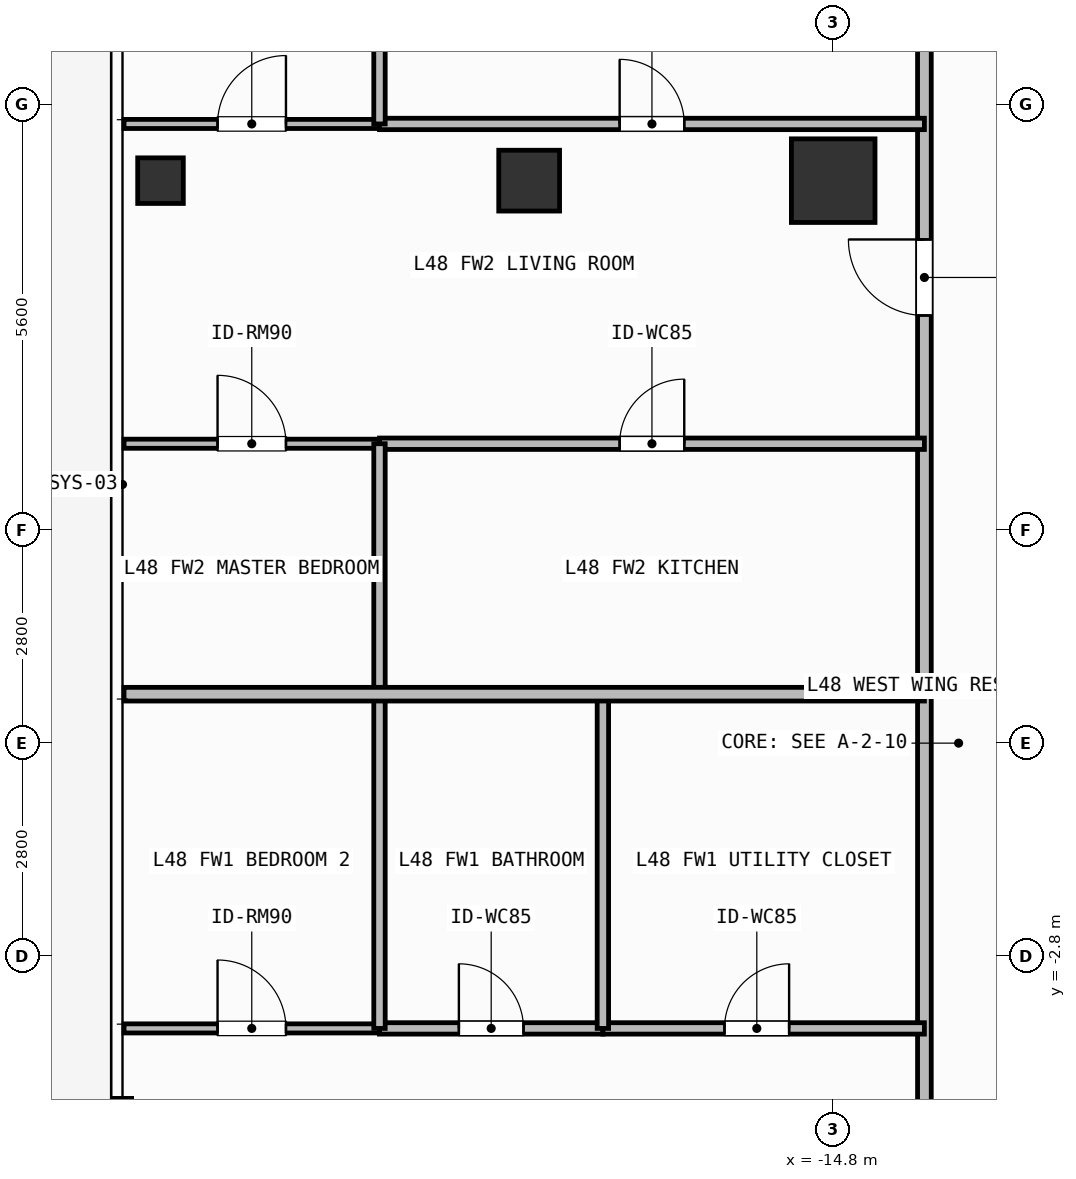
"""IFC4 building model, lengths in metres.
Left out: names, types, materials, properties, quantities, classifications, styles, units other than length and angle.
Written with IfcOpenShell. Run it as: python <this file> out.ifc"""

import sys

from ifc_helpers import new_model, si_unit, direction, frame, frame_2d, origin, origin_2d, place, context, subcontext, project, spatial, rectangle, hollow_rectangle, extrude, element, fill, save


model = new_model("IFC4")
c1 = context("Model", 3, precision=1e-05, world=origin(), true_north=direction((0.0, 1.0)))
c2 = subcontext(c1, "Body", "Model", "MODEL_VIEW")
j1 = project(units=[si_unit("LENGTHUNIT", "METRE"), si_unit("PLANEANGLEUNIT", "RADIAN")], contexts=[c1])
p1 = place(None, origin())
s1 = spatial("IfcSite", under=j1, at=p1, CompositionType="ELEMENT")
p2 = place(p1, origin())
s2 = spatial("IfcBuilding", under=s1, at=p2, CompositionType="ELEMENT")
p3 = place(p2, frame((0.0, 0.0, 195.3)))
s3 = spatial("IfcBuildingStorey", under=s2, at=p3, CompositionType="ELEMENT", Elevation=195.3)
p4 = place(p3, frame((-14.8, 7.4, 0.0), z_axis=(0.0, 0.0, 1.0), x_axis=(1.0, 0.0, 0.0)))
e1 = element("IfcColumn", 1, at=p4, inside=s3, PredefinedType="COLUMN", context=c2, shape_type="SweptSolid", body=[
    extrude(rectangle(XDim=1.1, YDim=1.1, at=origin_2d()), origin(), (0.0, 0.0, 1.0), 3.9),
])
p5 = place(p3, frame((-18.8, 7.4, 0.0), z_axis=(0.0, 0.0, 1.0), x_axis=(1.0, 0.0, 0.0)))
e2 = element("IfcColumn", 2, at=p5, inside=s3, PredefinedType="COLUMN", context=c2, shape_type="SweptSolid", body=[
    extrude(hollow_rectangle(XDim=0.8, YDim=0.8, WallThickness=0.036, at=origin_2d()), origin(), (0.0, 0.0, 1.0), 3.9),
])
p6 = place(p3, frame((-23.65, 7.4, 0.0), z_axis=(0.0, 0.0, 1.0), x_axis=(1.0, 0.0, 0.0)))
e3 = element("IfcColumn", 3, at=p6, inside=s3, PredefinedType="COLUMN", context=c2, shape_type="SweptSolid", body=[
    extrude(hollow_rectangle(XDim=0.6, YDim=0.6, WallThickness=0.028, at=origin_2d()), origin(), (0.0, 0.0, 1.0), 3.9),
])
p7 = place(p3, frame((-24.15, -6.254, 0.0), z_axis=(0.0, 0.0, 1.0), x_axis=(0.0, 1.0, 0.0)))
e4 = element("IfcWall", 4, at=p7, inside=s3, PredefinedType="SOLIDWALL", context=c2, shape_type="SweptSolid", body=[
    extrude(rectangle(XDim=1.58, YDim=0.24, at=frame_2d((0.79, 0.0))), origin(), (0.0, 0.0, 1.0), 3.68),
])
p8 = place(p7, frame((0.24, 0.0, 0.0)))
e5 = element("IfcOpeningElement", 5, at=p8, cuts=e4, PredefinedType="OPENING", context=c2, shape_type="SweptSolid", body=[
    extrude(rectangle(XDim=1.1, YDim=2.2, at=frame_2d((0.55, 1.1))), frame((0.0, 0.13, 0.0), z_axis=(0.0, -1.0, 0.0), x_axis=(1.0, 0.0, 0.0)), (0.0, 0.0, 1.0), 0.26),
])
p9 = place(p3, frame((-13.6, -12.12, 0.0), z_axis=(0.0, 0.0, 1.0), x_axis=(0.0, 1.0, 0.0)))
e6 = element("IfcWall", 6, at=p9, inside=s3, PredefinedType="PARTITIONING", context=c2, shape_type="SweptSolid", body=[
    extrude(rectangle(XDim=12.764, YDim=0.18, at=frame_2d((6.382, 0.0))), origin(), (0.0, 0.0, 1.0), 3.68),
])
p10 = place(p9, frame((5.346, 0.0, 0.0)))
e7 = element("IfcOpeningElement", 7, at=p10, cuts=e6, PredefinedType="OPENING", context=c2, shape_type="SweptSolid", body=[
    extrude(rectangle(XDim=1.0, YDim=2.2, at=frame_2d((0.5, 1.1))), frame((0.0, 0.1, 0.0), z_axis=(0.0, -1.0, 0.0), x_axis=(1.0, 0.0, 0.0)), (0.0, 0.0, 1.0), 0.2),
])
p11 = place(p3, frame((-20.769, -3.753, 0.0), z_axis=(0.0, 0.0, 1.0), x_axis=(1.0, 0.0, 0.0)))
e8 = element("IfcWall", 8, at=p11, inside=s3, PredefinedType="PARTITIONING", context=c2, shape_type="SweptSolid", body=[
    extrude(rectangle(XDim=2.939, YDim=0.15, at=frame_2d((1.469, 0.0))), origin(), (0.0, 0.0, 1.0), 3.68),
])
p12 = place(p11, frame((1.044, 0.0, 0.0)))
e9 = element("IfcOpeningElement", 9, at=p12, cuts=e8, PredefinedType="OPENING", context=c2, shape_type="SweptSolid", body=[
    extrude(rectangle(XDim=0.85, YDim=2.1, at=frame_2d((0.425, 1.05))), frame((0.0, 0.085, 0.0), z_axis=(0.0, -1.0, 0.0), x_axis=(1.0, 0.0, 0.0)), (0.0, 0.0, 1.0), 0.17),
])
p13 = place(p3, frame((-17.83, -3.753, 0.0), z_axis=(0.0, 0.0, 1.0), x_axis=(1.0, 0.0, 0.0)))
e10 = element("IfcWall", 10, at=p13, inside=s3, PredefinedType="PARTITIONING", context=c2, shape_type="SweptSolid", body=[
    extrude(rectangle(XDim=4.23, YDim=0.15, at=frame_2d((2.115, 0.0))), origin(), (0.0, 0.0, 1.0), 3.68),
])
p14 = place(p13, frame((1.6, 0.0, 0.0)))
e11 = element("IfcOpeningElement", 11, at=p14, cuts=e10, PredefinedType="OPENING", context=c2, shape_type="SweptSolid", body=[
    extrude(rectangle(XDim=0.85, YDim=2.1, at=frame_2d((0.425, 1.05))), frame((0.0, 0.085, 0.0), z_axis=(0.0, -1.0, 0.0), x_axis=(1.0, 0.0, 0.0)), (0.0, 0.0, 1.0), 0.17),
])
p15 = place(p3, frame((-24.13, -3.753, 0.0), z_axis=(0.0, 0.0, 1.0), x_axis=(1.0, 0.0, 0.0)))
e12 = element("IfcWall", 12, at=p15, inside=s3, PredefinedType="PARTITIONING", context=c2, shape_type="SweptSolid", body=[
    extrude(rectangle(XDim=3.361, YDim=0.12, at=frame_2d((1.68, 0.0))), origin(), (0.0, 0.0, 1.0), 3.68),
])
p16 = place(p15, frame((1.23, 0.0, 0.0)))
e13 = element("IfcOpeningElement", 13, at=p16, cuts=e12, PredefinedType="OPENING", context=c2, shape_type="SweptSolid", body=[
    extrude(rectangle(XDim=0.9, YDim=2.1, at=frame_2d((0.45, 1.05))), frame((0.0, 0.07, 0.0), z_axis=(0.0, -1.0, 0.0), x_axis=(1.0, 0.0, 0.0)), (0.0, 0.0, 1.0), 0.14),
])
p17 = place(p3, frame((-13.6, 0.644, 0.0), z_axis=(0.0, 0.0, 1.0), x_axis=(0.0, 1.0, 0.0)))
e14 = element("IfcWall", 14, at=p17, inside=s3, PredefinedType="PARTITIONING", context=c2, shape_type="SweptSolid", body=[
    extrude(rectangle(XDim=10.786, YDim=0.18, at=frame_2d((5.393, 0.0))), origin(), (0.0, 0.0, 1.0), 3.68),
])
p18 = place(p17, frame((4.982, 0.0, 0.0)))
e15 = element("IfcOpeningElement", 15, at=p18, cuts=e14, PredefinedType="OPENING", context=c2, shape_type="SweptSolid", body=[
    extrude(rectangle(XDim=1.0, YDim=2.2, at=frame_2d((0.5, 1.1))), frame((0.0, 0.1, 0.0), z_axis=(0.0, -1.0, 0.0), x_axis=(1.0, 0.0, 0.0)), (0.0, 0.0, 1.0), 0.2),
])
p19 = place(p3, frame((-20.769, 8.146, 0.0), z_axis=(0.0, 0.0, 1.0), x_axis=(1.0, 0.0, 0.0)))
e16 = element("IfcWall", 16, at=p19, inside=s3, PredefinedType="PARTITIONING", context=c2, shape_type="SweptSolid", body=[
    extrude(rectangle(XDim=7.169, YDim=0.15, at=frame_2d((3.584, 0.0))), origin(), (0.0, 0.0, 1.0), 3.68),
])
p20 = place(p19, frame((3.159, 0.0, 0.0)))
e17 = element("IfcOpeningElement", 17, at=p20, cuts=e16, PredefinedType="OPENING", context=c2, shape_type="SweptSolid", body=[
    extrude(rectangle(XDim=0.85, YDim=2.1, at=frame_2d((0.425, 1.05))), frame((0.0, 0.085, 0.0), z_axis=(0.0, -1.0, 0.0), x_axis=(1.0, 0.0, 0.0)), (0.0, 0.0, 1.0), 0.17),
])
p21 = place(p3, frame((-20.769, 3.939, 0.0), z_axis=(0.0, 0.0, 1.0), x_axis=(1.0, 0.0, 0.0)))
e18 = element("IfcWall", 18, at=p21, inside=s3, PredefinedType="PARTITIONING", context=c2, shape_type="SweptSolid", body=[
    extrude(rectangle(XDim=7.169, YDim=0.15, at=frame_2d((3.584, 0.0))), origin(), (0.0, 0.0, 1.0), 3.68),
])
p22 = place(p21, frame((3.159, 0.0, 0.0)))
e19 = element("IfcOpeningElement", 19, at=p22, cuts=e18, PredefinedType="OPENING", context=c2, shape_type="SweptSolid", body=[
    extrude(rectangle(XDim=0.85, YDim=2.1, at=frame_2d((0.425, 1.05))), frame((0.0, 0.085, 0.0), z_axis=(0.0, -1.0, 0.0), x_axis=(1.0, 0.0, 0.0)), (0.0, 0.0, 1.0), 0.17),
])
p23 = place(p3, frame((-24.13, 3.939, 0.0), z_axis=(0.0, 0.0, 1.0), x_axis=(1.0, 0.0, 0.0)))
e20 = element("IfcWall", 20, at=p23, inside=s3, PredefinedType="PARTITIONING", context=c2, shape_type="SweptSolid", body=[
    extrude(rectangle(XDim=3.361, YDim=0.12, at=frame_2d((1.68, 0.0))), origin(), (0.0, 0.0, 1.0), 3.68),
])
p24 = place(p23, frame((1.23, 0.0, 0.0)))
e21 = element("IfcOpeningElement", 21, at=p24, cuts=e20, PredefinedType="OPENING", context=c2, shape_type="SweptSolid", body=[
    extrude(rectangle(XDim=0.9, YDim=2.1, at=frame_2d((0.45, 1.05))), frame((0.0, 0.07, 0.0), z_axis=(0.0, -1.0, 0.0), x_axis=(1.0, 0.0, 0.0)), (0.0, 0.0, 1.0), 0.14),
])
p25 = place(p3, frame((-24.13, 8.146, 0.0), z_axis=(0.0, 0.0, 1.0), x_axis=(1.0, 0.0, 0.0)))
e22 = element("IfcWall", 22, at=p25, inside=s3, PredefinedType="PARTITIONING", context=c2, shape_type="SweptSolid", body=[
    extrude(rectangle(XDim=3.361, YDim=0.12, at=frame_2d((1.68, 0.0))), origin(), (0.0, 0.0, 1.0), 3.68),
])
p26 = place(p25, frame((1.23, 0.0, 0.0)))
e23 = element("IfcOpeningElement", 23, at=p26, cuts=e22, PredefinedType="OPENING", context=c2, shape_type="SweptSolid", body=[
    extrude(rectangle(XDim=0.9, YDim=2.1, at=frame_2d((0.45, 1.05))), frame((0.0, 0.07, 0.0), z_axis=(0.0, -1.0, 0.0), x_axis=(1.0, 0.0, 0.0)), (0.0, 0.0, 1.0), 0.14),
])
for number, where, z_axis, x_axis in (
    (24, (-17.83, -3.753, 0.0), (0.0, 0.0, 1.0), (0.0, 1.0, 0.0)),
    (25, (-20.769, -3.753, 0.0), (0.0, 0.0, 1.0), (0.0, 1.0, 0.0)),
):
    element("IfcWall", number, at=place(p3, frame(where, z_axis=z_axis, x_axis=x_axis)), inside=s3, PredefinedType="PARTITIONING", context=c2, shape_type="SweptSolid", body=[
        extrude(rectangle(XDim=4.397, YDim=0.15, at=frame_2d((2.198, 0.0))), origin(), (0.0, 0.0, 1.0), 3.68),
    ])
p27 = place(p3, frame((-20.769, 0.644, 0.0), z_axis=(0.0, 0.0, 1.0), x_axis=(0.0, 1.0, 0.0)))
e26 = element("IfcWall", 26, at=p27, inside=s3, PredefinedType="PARTITIONING", context=c2, shape_type="SweptSolid", body=[
    extrude(rectangle(XDim=3.295, YDim=0.15, at=frame_2d((1.647, 0.0))), origin(), (0.0, 0.0, 1.0), 3.68),
])
p28 = place(p3, frame((-20.769, 8.146, 0.0), z_axis=(0.0, 0.0, 1.0), x_axis=(0.0, 1.0, 0.0)))
e27 = element("IfcWall", 27, at=p28, inside=s3, PredefinedType="PARTITIONING", context=c2, shape_type="SweptSolid", body=[
    extrude(rectangle(XDim=3.284, YDim=0.15, at=frame_2d((1.642, 0.0))), origin(), (0.0, 0.0, 1.0), 3.68),
])
p29 = place(p3, frame((-24.13, 0.644, 0.0), z_axis=(0.0, 0.0, 1.0), x_axis=(1.0, 0.0, 0.0)))
e28 = element("IfcWall", 28, at=p29, inside=s3, PredefinedType="PARTITIONING", context=c2, shape_type="SweptSolid", body=[
    extrude(rectangle(XDim=10.53, YDim=0.18, at=frame_2d((5.265, 0.0))), origin(), (0.0, 0.0, 1.0), 3.68),
])
p30 = place(p12, origin())
e29 = element("IfcDoor", 29, at=p30, inside=s3, OperationType="SINGLE_SWING_LEFT", PredefinedType="DOOR", context=c2, shape_type="SweptSolid", body=[
    extrude(rectangle(XDim=0.85, YDim=2.1, at=frame_2d((0.425, 1.05))), frame((0.0, 0.025, 0.0), z_axis=(0.0, -1.0, 0.0), x_axis=(1.0, 0.0, 0.0)), (0.0, 0.0, 1.0), 0.05),
])
fill(e9, e29)
p31 = place(p14, origin())
e30 = element("IfcDoor", 30, at=p31, inside=s3, OperationType="SINGLE_SWING_RIGHT", PredefinedType="DOOR", context=c2, shape_type="SweptSolid", body=[
    extrude(rectangle(XDim=0.85, YDim=2.1, at=frame_2d((0.425, 1.05))), frame((0.0, 0.025, 0.0), z_axis=(0.0, -1.0, 0.0), x_axis=(1.0, 0.0, 0.0)), (0.0, 0.0, 1.0), 0.05),
])
fill(e11, e30)
p32 = place(p16, origin())
e31 = element("IfcDoor", 31, at=p32, inside=s3, OperationType="SINGLE_SWING_LEFT", PredefinedType="DOOR", context=c2, shape_type="SweptSolid", body=[
    extrude(rectangle(XDim=0.9, YDim=2.1, at=frame_2d((0.45, 1.05))), frame((0.0, 0.025, 0.0), z_axis=(0.0, -1.0, 0.0), x_axis=(1.0, 0.0, 0.0)), (0.0, 0.0, 1.0), 0.05),
])
fill(e13, e31)
p33 = place(p18, origin())
e32 = element("IfcDoor", 32, at=p33, inside=s3, OperationType="SINGLE_SWING_RIGHT", PredefinedType="DOOR", context=c2, shape_type="SweptSolid", body=[
    extrude(rectangle(XDim=1.0, YDim=2.2, at=frame_2d((0.5, 1.1))), frame((0.0, 0.025, 0.0), z_axis=(0.0, -1.0, 0.0), x_axis=(1.0, 0.0, 0.0)), (0.0, 0.0, 1.0), 0.05),
])
fill(e15, e32)
p34 = place(p20, origin())
e33 = element("IfcDoor", 33, at=p34, inside=s3, OperationType="SINGLE_SWING_LEFT", PredefinedType="DOOR", context=c2, shape_type="SweptSolid", body=[
    extrude(rectangle(XDim=0.85, YDim=2.1, at=frame_2d((0.425, 1.05))), frame((0.0, 0.025, 0.0), z_axis=(0.0, -1.0, 0.0), x_axis=(1.0, 0.0, 0.0)), (0.0, 0.0, 1.0), 0.05),
])
fill(e17, e33)
p35 = place(p22, origin())
e34 = element("IfcDoor", 34, at=p35, inside=s3, OperationType="SINGLE_SWING_RIGHT", PredefinedType="DOOR", context=c2, shape_type="SweptSolid", body=[
    extrude(rectangle(XDim=0.85, YDim=2.1, at=frame_2d((0.425, 1.05))), frame((0.0, 0.025, 0.0), z_axis=(0.0, -1.0, 0.0), x_axis=(1.0, 0.0, 0.0)), (0.0, 0.0, 1.0), 0.05),
])
fill(e19, e34)
p36 = place(p24, origin())
e35 = element("IfcDoor", 35, at=p36, inside=s3, OperationType="SINGLE_SWING_LEFT", PredefinedType="DOOR", context=c2, shape_type="SweptSolid", body=[
    extrude(rectangle(XDim=0.9, YDim=2.1, at=frame_2d((0.45, 1.05))), frame((0.0, 0.025, 0.0), z_axis=(0.0, -1.0, 0.0), x_axis=(1.0, 0.0, 0.0)), (0.0, 0.0, 1.0), 0.05),
])
fill(e21, e35)
p37 = place(p26, origin())
e36 = element("IfcDoor", 36, at=p37, inside=s3, OperationType="SINGLE_SWING_RIGHT", PredefinedType="DOOR", context=c2, shape_type="SweptSolid", body=[
    extrude(rectangle(XDim=0.9, YDim=2.1, at=frame_2d((0.45, 1.05))), frame((0.0, 0.025, 0.0), z_axis=(0.0, -1.0, 0.0), x_axis=(1.0, 0.0, 0.0)), (0.0, 0.0, 1.0), 0.05),
])
fill(e23, e36)
save(model, sys.argv[1])
